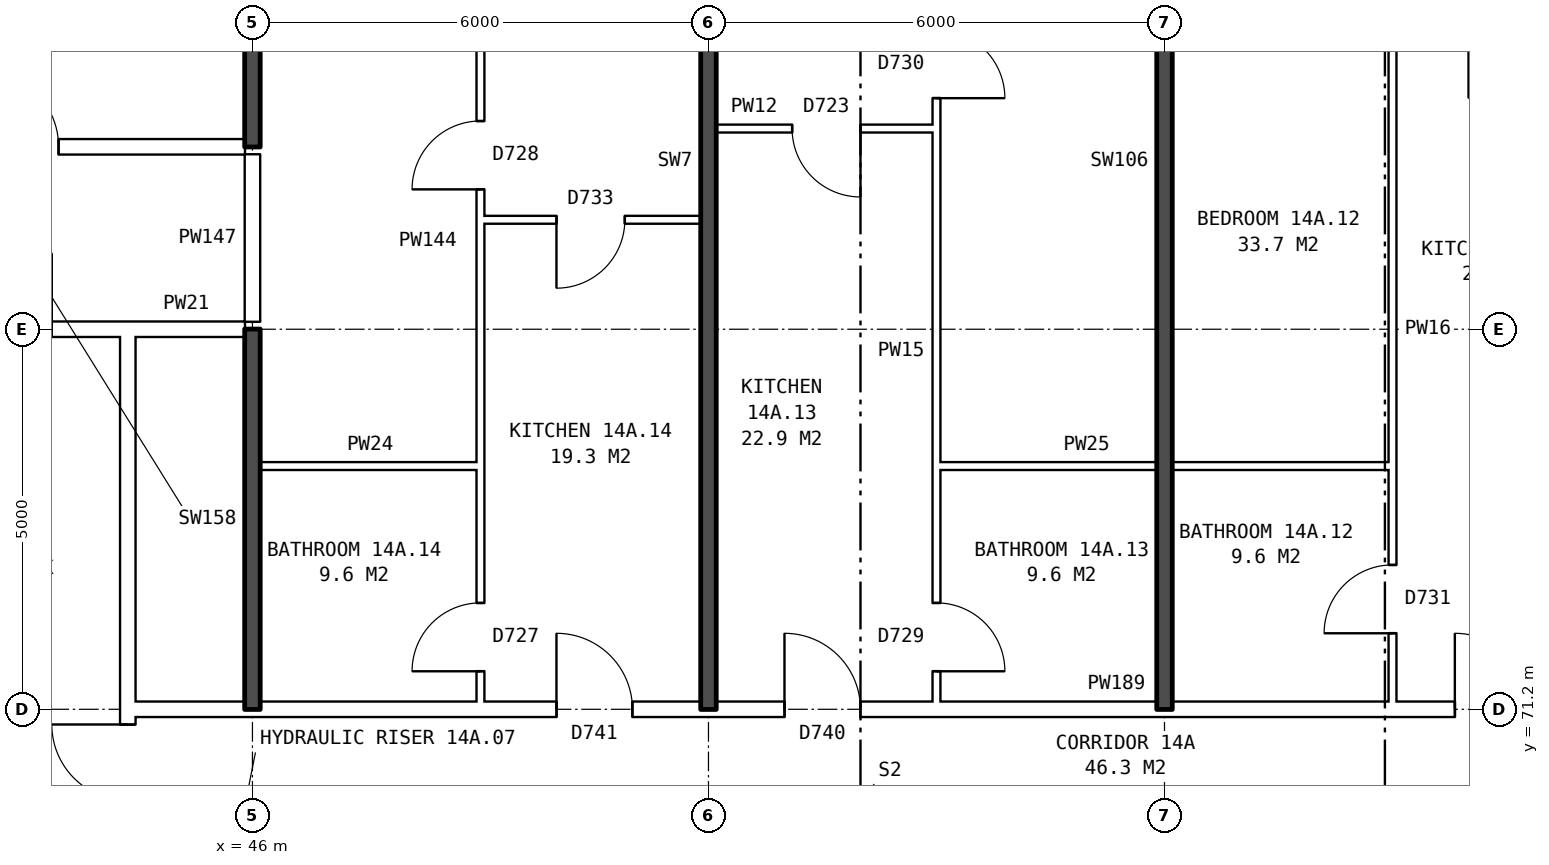
"""IFC4 building model, lengths in metres.
Left out: names, types, materials, properties, quantities, classifications, styles, units other than length and angle.
Written with IfcOpenShell. Run it as: python <this file> out.ifc"""

import sys

from ifc_helpers import new_model, si_unit, direction, frame, frame_2d, origin, place, context, subcontext, project, spatial, rectangle, extrude, element, fill, save


model = new_model("IFC4")
c1 = context("Model", 3, precision=1e-05, world=origin(), true_north=direction((0.0, 1.0)))
c2 = subcontext(c1, "Body", "Model", "MODEL_VIEW")
j1 = project(units=[si_unit("LENGTHUNIT", "METRE"), si_unit("PLANEANGLEUNIT", "RADIAN")], contexts=[c1])
p1 = place(None, origin())
s1 = spatial("IfcSite", under=j1, at=p1, CompositionType="ELEMENT")
p2 = place(p1, origin())
s2 = spatial("IfcBuilding", under=s1, at=p2, CompositionType="ELEMENT")
p3 = place(p2, frame((0.0, 0.0, 53.6)))
s3 = spatial("IfcBuildingStorey", under=s2, at=p3, CompositionType="ELEMENT", Elevation=53.6)
p4 = place(p3, frame((44.36, 63.9, 0.0), z_axis=(0.0, 0.0, 1.0), x_axis=(0.0, 1.0, 0.0)))
e1 = element("IfcWall", 1, at=p4, inside=s3, PredefinedType="PARTITIONING", context=c2, shape_type="SweptSolid", body=[
    extrude(rectangle(XDim=12.2, YDim=0.2, at=frame_2d((6.1, 0.0))), origin(), (0.0, 0.0, 1.0), 2.85),
])
p5 = place(p4, frame((5.1, 0.0, 0.0)))
e2 = element("IfcOpeningElement", 2, at=p5, cuts=e1, PredefinedType="OPENING", context=c2, shape_type="SweptSolid", body=[
    extrude(rectangle(XDim=2.0, YDim=2.1, at=frame_2d((1.0, 1.05))), frame((0.0, 0.11, 0.0), z_axis=(0.0, -1.0, 0.0), x_axis=(1.0, 0.0, 0.0)), (0.0, 0.0, 1.0), 0.22),
])
p6 = place(p3, frame((44.36, 71.2, 0.0), z_axis=(0.0, 0.0, 1.0), x_axis=(1.0, 0.0, 0.0)))
e3 = element("IfcWall", 3, at=p6, inside=s3, PredefinedType="PARTITIONING", context=c2, shape_type="SweptSolid", body=[
    extrude(rectangle(XDim=19.28, YDim=0.2, at=frame_2d((9.64, 0.0))), origin(), (0.0, 0.0, 1.0), 2.85),
])
p7 = place(p6, frame((17.46, 0.0, 0.0)))
e4 = element("IfcOpeningElement", 4, at=p7, cuts=e3, PredefinedType="OPENING", context=c2, shape_type="SweptSolid", body=[
    extrude(rectangle(XDim=1.0, YDim=2.1, at=frame_2d((0.5, 1.05))), frame((0.0, 0.11, 0.0), z_axis=(0.0, -1.0, 0.0), x_axis=(1.0, 0.0, 0.0)), (0.0, 0.0, 1.0), 0.22),
])
p8 = place(p6, frame((8.64, 0.0, 0.0)))
e5 = element("IfcOpeningElement", 5, at=p8, cuts=e3, PredefinedType="OPENING", context=c2, shape_type="SweptSolid", body=[
    extrude(rectangle(XDim=1.0, YDim=2.1, at=frame_2d((0.5, 1.05))), frame((0.0, 0.11, 0.0), z_axis=(0.0, -1.0, 0.0), x_axis=(1.0, 0.0, 0.0)), (0.0, 0.0, 1.0), 0.22),
])
p9 = place(p6, frame((5.64, 0.0, 0.0)))
e6 = element("IfcOpeningElement", 6, at=p9, cuts=e3, PredefinedType="OPENING", context=c2, shape_type="SweptSolid", body=[
    extrude(rectangle(XDim=1.0, YDim=2.1, at=frame_2d((0.5, 1.05))), frame((0.0, 0.11, 0.0), z_axis=(0.0, -1.0, 0.0), x_axis=(1.0, 0.0, 0.0)), (0.0, 0.0, 1.0), 0.22),
])
p10 = place(p3, frame((46.1, 74.4, 0.0), z_axis=(0.0, 0.0, 1.0), x_axis=(1.0, 0.0, 0.0)))
e7 = element("IfcWall", 7, at=p10, inside=s3, PredefinedType="PARTITIONING", context=c2, shape_type="SweptSolid", body=[
    extrude(rectangle(XDim=2.9, YDim=0.1, at=frame_2d((1.45, 0.0))), origin(), (0.0, 0.0, 1.0), 2.85),
])
p11 = place(p3, frame((55.0, 74.4, 0.0), z_axis=(0.0, 0.0, 1.0), x_axis=(1.0, 0.0, 0.0)))
e8 = element("IfcWall", 8, at=p11, inside=s3, PredefinedType="PARTITIONING", context=c2, shape_type="SweptSolid", body=[
    extrude(rectangle(XDim=6.0, YDim=0.1, at=frame_2d((3.0, 0.0))), origin(), (0.0, 0.0, 1.0), 2.85),
])
p12 = place(p3, frame((41.36, 76.2, 0.0), z_axis=(0.0, 0.0, 1.0), x_axis=(1.0, 0.0, 0.0)))
e9 = element("IfcWall", 9, at=p12, inside=s3, PredefinedType="PARTITIONING", context=c2, shape_type="SweptSolid", body=[
    extrude(rectangle(XDim=3.0, YDim=0.2, at=frame_2d((1.5, 0.0))), origin(), (0.0, 0.0, 1.0), 2.85),
])
p13 = place(p12, frame((1.0, 0.0, 0.0)))
e10 = element("IfcOpeningElement", 10, at=p13, cuts=e9, PredefinedType="OPENING", context=c2, shape_type="SweptSolid", body=[
    extrude(rectangle(XDim=1.0, YDim=2.1, at=frame_2d((0.5, 1.05))), frame((0.0, 0.11, 0.0), z_axis=(0.0, -1.0, 0.0), x_axis=(1.0, 0.0, 0.0)), (0.0, 0.0, 1.0), 0.22),
])
p14 = place(p3, frame((44.36, 76.2, 0.0), z_axis=(0.0, 0.0, 1.0), x_axis=(1.0, 0.0, 0.0)))
e11 = element("IfcWall", 11, at=p14, inside=s3, PredefinedType="PARTITIONING", context=c2, shape_type="SweptSolid", body=[
    extrude(rectangle(XDim=1.54, YDim=0.2, at=frame_2d((0.77, 0.0))), origin(), (0.0, 0.0, 1.0), 2.85),
])
p15 = place(p3, frame((49.0, 77.64, 0.0), z_axis=(0.0, 0.0, 1.0), x_axis=(1.0, 0.0, 0.0)))
e12 = element("IfcWall", 12, at=p15, inside=s3, PredefinedType="PARTITIONING", context=c2, shape_type="SweptSolid", body=[
    extrude(rectangle(XDim=2.9, YDim=0.1, at=frame_2d((1.45, 0.0))), origin(), (0.0, 0.0, 1.0), 2.85),
])
p16 = place(p15, frame((1.0, 0.0, 0.0)))
e13 = element("IfcOpeningElement", 13, at=p16, cuts=e12, PredefinedType="OPENING", context=c2, shape_type="SweptSolid", body=[
    extrude(rectangle(XDim=0.9, YDim=2.1, at=frame_2d((0.45, 1.05))), frame((0.0, 0.06, 0.0), z_axis=(0.0, -1.0, 0.0), x_axis=(1.0, 0.0, 0.0)), (0.0, 0.0, 1.0), 0.12),
])
p17 = place(p3, frame((21.86, 78.6, 0.0), z_axis=(0.0, 0.0, 1.0), x_axis=(1.0, 0.0, 0.0)))
e14 = element("IfcWall", 14, at=p17, inside=s3, PredefinedType="PARTITIONING", context=c2, shape_type="SweptSolid", body=[
    extrude(rectangle(XDim=24.04, YDim=0.2, at=frame_2d((12.02, 0.0))), origin(), (0.0, 0.0, 1.0), 2.85),
])
p18 = place(p17, frame((20.59, 0.0, 0.0)))
e15 = element("IfcOpeningElement", 15, at=p18, cuts=e14, PredefinedType="OPENING", context=c2, shape_type="SweptSolid", body=[
    extrude(rectangle(XDim=1.0, YDim=2.1, at=frame_2d((0.5, 1.05))), frame((0.0, 0.11, 0.0), z_axis=(0.0, -1.0, 0.0), x_axis=(1.0, 0.0, 0.0)), (0.0, 0.0, 1.0), 0.22),
])
p19 = place(p17, frame((8.64, 0.0, 0.0)))
e16 = element("IfcOpeningElement", 16, at=p19, cuts=e14, PredefinedType="OPENING", context=c2, shape_type="SweptSolid", body=[
    extrude(rectangle(XDim=1.0, YDim=2.1, at=frame_2d((0.5, 1.05))), frame((0.0, 0.11, 0.0), z_axis=(0.0, -1.0, 0.0), x_axis=(1.0, 0.0, 0.0)), (0.0, 0.0, 1.0), 0.22),
])
p20 = place(p17, frame((3.64, 0.0, 0.0)))
e17 = element("IfcOpeningElement", 17, at=p20, cuts=e14, PredefinedType="OPENING", context=c2, shape_type="SweptSolid", body=[
    extrude(rectangle(XDim=1.0, YDim=2.1, at=frame_2d((0.5, 1.05))), frame((0.0, 0.11, 0.0), z_axis=(0.0, -1.0, 0.0), x_axis=(1.0, 0.0, 0.0)), (0.0, 0.0, 1.0), 0.22),
])
p21 = place(p3, frame((52.1, 78.84, 0.0), z_axis=(0.0, 0.0, 1.0), x_axis=(1.0, 0.0, 0.0)))
e18 = element("IfcWall", 18, at=p21, inside=s3, PredefinedType="PARTITIONING", context=c2, shape_type="SweptSolid", body=[
    extrude(rectangle(XDim=2.9, YDim=0.1, at=frame_2d((1.45, 0.0))), origin(), (0.0, 0.0, 1.0), 2.85),
])
p22 = place(p21, frame((1.0, 0.0, 0.0)))
e19 = element("IfcOpeningElement", 19, at=p22, cuts=e18, PredefinedType="OPENING", context=c2, shape_type="SweptSolid", body=[
    extrude(rectangle(XDim=0.9, YDim=2.1, at=frame_2d((0.45, 1.05))), frame((0.0, 0.06, 0.0), z_axis=(0.0, -1.0, 0.0), x_axis=(1.0, 0.0, 0.0)), (0.0, 0.0, 1.0), 0.12),
])
p23 = place(p3, frame((46.0, 71.2, 0.0), z_axis=(0.0, 0.0, 1.0), x_axis=(0.0, 1.0, 0.0)))
e20 = element("IfcWall", 20, at=p23, inside=s3, PredefinedType="SOLIDWALL", context=c2, shape_type="SweptSolid", body=[
    extrude(rectangle(XDim=5.0, YDim=0.2, at=frame_2d((2.5, 0.0))), origin(), (0.0, 0.0, 1.0), 2.85),
])
p24 = place(p3, frame((46.0, 76.3, 0.0), z_axis=(0.0, 0.0, 1.0), x_axis=(0.0, 1.0, 0.0)))
e21 = element("IfcWall", 21, at=p24, inside=s3, PredefinedType="PARTITIONING", context=c2, shape_type="SweptSolid", body=[
    extrude(rectangle(XDim=2.2, YDim=0.2, at=frame_2d((1.1, 0.0))), origin(), (0.0, 0.0, 1.0), 2.85),
])
p25 = place(p3, frame((46.0, 78.6, 0.0), z_axis=(0.0, 0.0, 1.0), x_axis=(0.0, 1.0, 0.0)))
e22 = element("IfcWall", 22, at=p25, inside=s3, PredefinedType="SOLIDWALL", context=c2, shape_type="SweptSolid", body=[
    extrude(rectangle(XDim=7.04, YDim=0.2, at=frame_2d((3.52, 0.0))), origin(), (0.0, 0.0, 1.0), 2.85),
])
p26 = place(p3, frame((49.0, 71.3, 0.0), z_axis=(0.0, 0.0, 1.0), x_axis=(0.0, 1.0, 0.0)))
e23 = element("IfcWall", 23, at=p26, inside=s3, PredefinedType="PARTITIONING", context=c2, shape_type="SweptSolid", body=[
    extrude(rectangle(XDim=14.34, YDim=0.1, at=frame_2d((7.17, 0.0))), origin(), (0.0, 0.0, 1.0), 2.85),
])
p27 = place(p26, frame((6.74, 0.0, 0.0)))
e24 = element("IfcOpeningElement", 24, at=p27, cuts=e23, PredefinedType="OPENING", context=c2, shape_type="SweptSolid", body=[
    extrude(rectangle(XDim=0.9, YDim=2.1, at=frame_2d((0.45, 1.05))), frame((0.0, 0.06, 0.0), z_axis=(0.0, -1.0, 0.0), x_axis=(1.0, 0.0, 0.0)), (0.0, 0.0, 1.0), 0.12),
])
p28 = place(p26, frame((0.4, 0.0, 0.0)))
e25 = element("IfcOpeningElement", 25, at=p28, cuts=e23, PredefinedType="OPENING", context=c2, shape_type="SweptSolid", body=[
    extrude(rectangle(XDim=0.9, YDim=2.1, at=frame_2d((0.45, 1.05))), frame((0.0, 0.06, 0.0), z_axis=(0.0, -1.0, 0.0), x_axis=(1.0, 0.0, 0.0)), (0.0, 0.0, 1.0), 0.12),
])
p29 = place(p3, frame((52.0, 71.2, 0.0), z_axis=(0.0, 0.0, 1.0), x_axis=(0.0, 1.0, 0.0)))
e26 = element("IfcWall", 26, at=p29, inside=s3, PredefinedType="SOLIDWALL", context=c2, shape_type="SweptSolid", body=[
    extrude(rectangle(XDim=14.44, YDim=0.2, at=frame_2d((7.22, 0.0))), origin(), (0.0, 0.0, 1.0), 2.85),
])
p30 = place(p3, frame((55.0, 71.3, 0.0), z_axis=(0.0, 0.0, 1.0), x_axis=(0.0, 1.0, 0.0)))
e27 = element("IfcWall", 27, at=p30, inside=s3, PredefinedType="PARTITIONING", context=c2, shape_type="SweptSolid", body=[
    extrude(rectangle(XDim=14.34, YDim=0.1, at=frame_2d((7.17, 0.0))), origin(), (0.0, 0.0, 1.0), 2.85),
])
p31 = place(p30, frame((7.94, 0.0, 0.0)))
e28 = element("IfcOpeningElement", 28, at=p31, cuts=e27, PredefinedType="OPENING", context=c2, shape_type="SweptSolid", body=[
    extrude(rectangle(XDim=0.9, YDim=2.1, at=frame_2d((0.45, 1.05))), frame((0.0, 0.06, 0.0), z_axis=(0.0, -1.0, 0.0), x_axis=(1.0, 0.0, 0.0)), (0.0, 0.0, 1.0), 0.12),
])
p32 = place(p30, frame((0.4, 0.0, 0.0)))
e29 = element("IfcOpeningElement", 29, at=p32, cuts=e27, PredefinedType="OPENING", context=c2, shape_type="SweptSolid", body=[
    extrude(rectangle(XDim=0.9, YDim=2.1, at=frame_2d((0.45, 1.05))), frame((0.0, 0.06, 0.0), z_axis=(0.0, -1.0, 0.0), x_axis=(1.0, 0.0, 0.0)), (0.0, 0.0, 1.0), 0.12),
])
p33 = place(p3, frame((58.0, 71.2, 0.0), z_axis=(0.0, 0.0, 1.0), x_axis=(0.0, 1.0, 0.0)))
e30 = element("IfcWall", 30, at=p33, inside=s3, PredefinedType="SOLIDWALL", context=c2, shape_type="SweptSolid", body=[
    extrude(rectangle(XDim=14.44, YDim=0.2, at=frame_2d((7.22, 0.0))), origin(), (0.0, 0.0, 1.0), 2.85),
])
p34 = place(p3, frame((61.0, 71.3, 0.0), z_axis=(0.0, 0.0, 1.0), x_axis=(0.0, 1.0, 0.0)))
e31 = element("IfcWall", 31, at=p34, inside=s3, PredefinedType="PARTITIONING", context=c2, shape_type="SweptSolid", body=[
    extrude(rectangle(XDim=14.34, YDim=0.1, at=frame_2d((7.17, 0.0))), origin(), (0.0, 0.0, 1.0), 2.85),
])
p35 = place(p34, frame((9.24, 0.0, 0.0)))
e32 = element("IfcOpeningElement", 32, at=p35, cuts=e31, PredefinedType="OPENING", context=c2, shape_type="SweptSolid", body=[
    extrude(rectangle(XDim=0.9, YDim=2.1, at=frame_2d((0.45, 1.05))), frame((0.0, 0.06, 0.0), z_axis=(0.0, -1.0, 0.0), x_axis=(1.0, 0.0, 0.0)), (0.0, 0.0, 1.0), 0.12),
])
p36 = place(p34, frame((0.9, 0.0, 0.0)))
e33 = element("IfcOpeningElement", 33, at=p36, cuts=e31, PredefinedType="OPENING", context=c2, shape_type="SweptSolid", body=[
    extrude(rectangle(XDim=0.9, YDim=2.1, at=frame_2d((0.45, 1.05))), frame((0.0, 0.06, 0.0), z_axis=(0.0, -1.0, 0.0), x_axis=(1.0, 0.0, 0.0)), (0.0, 0.0, 1.0), 0.12),
])
p37 = place(p5, origin())
e34 = element("IfcDoor", 34, at=p37, inside=s3, OperationType="DOUBLE_DOOR_SINGLE_SWING", PredefinedType="DOOR", context=c2, shape_type="SweptSolid", body=[
    extrude(rectangle(XDim=2.0, YDim=2.1, at=frame_2d((1.0, 1.05))), frame((0.0, 0.025, 0.0), z_axis=(0.0, -1.0, 0.0), x_axis=(1.0, 0.0, 0.0)), (0.0, 0.0, 1.0), 0.05),
])
fill(e2, e34)
p38 = place(p7, origin())
e35 = element("IfcDoor", 35, at=p38, inside=s3, OperationType="SINGLE_SWING_LEFT", PredefinedType="DOOR", context=c2, shape_type="SweptSolid", body=[
    extrude(rectangle(XDim=1.0, YDim=2.1, at=frame_2d((0.5, 1.05))), frame((0.0, 0.025, 0.0), z_axis=(0.0, -1.0, 0.0), x_axis=(1.0, 0.0, 0.0)), (0.0, 0.0, 1.0), 0.05),
])
fill(e4, e35)
p39 = place(p36, origin())
e36 = element("IfcDoor", 36, at=p39, inside=s3, OperationType="SINGLE_SWING_LEFT", PredefinedType="DOOR", context=c2, shape_type="SweptSolid", body=[
    extrude(rectangle(XDim=0.9, YDim=2.1, at=frame_2d((0.45, 1.05))), frame((0.0, 0.025, 0.0), z_axis=(0.0, -1.0, 0.0), x_axis=(1.0, 0.0, 0.0)), (0.0, 0.0, 1.0), 0.05),
])
fill(e33, e36)
p40 = place(p31, frame((0.9, 0.0, 0.0), z_axis=(0.0, 0.0, 1.0), x_axis=(-1.0, 0.0, 0.0)))
e37 = element("IfcDoor", 37, at=p40, inside=s3, OperationType="SINGLE_SWING_RIGHT", PredefinedType="DOOR", context=c2, shape_type="SweptSolid", body=[
    extrude(rectangle(XDim=0.9, YDim=2.1, at=frame_2d((0.45, 1.05))), frame((0.0, 0.025, 0.0), z_axis=(0.0, -1.0, 0.0), x_axis=(1.0, 0.0, 0.0)), (0.0, 0.0, 1.0), 0.05),
])
fill(e28, e37)
p41 = place(p8, origin())
e38 = element("IfcDoor", 38, at=p41, inside=s3, OperationType="SINGLE_SWING_LEFT", PredefinedType="DOOR", context=c2, shape_type="SweptSolid", body=[
    extrude(rectangle(XDim=1.0, YDim=2.1, at=frame_2d((0.5, 1.05))), frame((0.0, 0.025, 0.0), z_axis=(0.0, -1.0, 0.0), x_axis=(1.0, 0.0, 0.0)), (0.0, 0.0, 1.0), 0.05),
])
fill(e5, e38)
p42 = place(p22, frame((0.9, 0.0, 0.0), z_axis=(0.0, 0.0, 1.0), x_axis=(-1.0, 0.0, 0.0)))
e39 = element("IfcDoor", 39, at=p42, inside=s3, OperationType="SINGLE_SWING_LEFT", PredefinedType="DOOR", context=c2, shape_type="SweptSolid", body=[
    extrude(rectangle(XDim=0.9, YDim=2.1, at=frame_2d((0.45, 1.05))), frame((0.0, 0.025, 0.0), z_axis=(0.0, -1.0, 0.0), x_axis=(1.0, 0.0, 0.0)), (0.0, 0.0, 1.0), 0.05),
])
fill(e19, e39)
p43 = place(p32, frame((0.9, 0.0, 0.0), z_axis=(0.0, 0.0, 1.0), x_axis=(-1.0, 0.0, 0.0)))
e40 = element("IfcDoor", 40, at=p43, inside=s3, OperationType="SINGLE_SWING_RIGHT", PredefinedType="DOOR", context=c2, shape_type="SweptSolid", body=[
    extrude(rectangle(XDim=0.9, YDim=2.1, at=frame_2d((0.45, 1.05))), frame((0.0, 0.025, 0.0), z_axis=(0.0, -1.0, 0.0), x_axis=(1.0, 0.0, 0.0)), (0.0, 0.0, 1.0), 0.05),
])
fill(e29, e40)
p44 = place(p27, origin())
e41 = element("IfcDoor", 41, at=p44, inside=s3, OperationType="SINGLE_SWING_LEFT", PredefinedType="DOOR", context=c2, shape_type="SweptSolid", body=[
    extrude(rectangle(XDim=0.9, YDim=2.1, at=frame_2d((0.45, 1.05))), frame((0.0, 0.025, 0.0), z_axis=(0.0, -1.0, 0.0), x_axis=(1.0, 0.0, 0.0)), (0.0, 0.0, 1.0), 0.05),
])
fill(e24, e41)
p45 = place(p9, origin())
e42 = element("IfcDoor", 42, at=p45, inside=s3, OperationType="SINGLE_SWING_LEFT", PredefinedType="DOOR", context=c2, shape_type="SweptSolid", body=[
    extrude(rectangle(XDim=1.0, YDim=2.1, at=frame_2d((0.5, 1.05))), frame((0.0, 0.025, 0.0), z_axis=(0.0, -1.0, 0.0), x_axis=(1.0, 0.0, 0.0)), (0.0, 0.0, 1.0), 0.05),
])
fill(e6, e42)
p46 = place(p16, frame((0.9, 0.0, 0.0), z_axis=(0.0, 0.0, 1.0), x_axis=(-1.0, 0.0, 0.0)))
e43 = element("IfcDoor", 43, at=p46, inside=s3, OperationType="SINGLE_SWING_RIGHT", PredefinedType="DOOR", context=c2, shape_type="SweptSolid", body=[
    extrude(rectangle(XDim=0.9, YDim=2.1, at=frame_2d((0.45, 1.05))), frame((0.0, 0.025, 0.0), z_axis=(0.0, -1.0, 0.0), x_axis=(1.0, 0.0, 0.0)), (0.0, 0.0, 1.0), 0.05),
])
fill(e13, e43)
p47 = place(p28, origin())
e44 = element("IfcDoor", 44, at=p47, inside=s3, OperationType="SINGLE_SWING_LEFT", PredefinedType="DOOR", context=c2, shape_type="SweptSolid", body=[
    extrude(rectangle(XDim=0.9, YDim=2.1, at=frame_2d((0.45, 1.05))), frame((0.0, 0.025, 0.0), z_axis=(0.0, -1.0, 0.0), x_axis=(1.0, 0.0, 0.0)), (0.0, 0.0, 1.0), 0.05),
])
fill(e25, e44)
p48 = place(p18, origin())
e45 = element("IfcDoor", 45, at=p48, inside=s3, OperationType="SINGLE_SWING_LEFT", PredefinedType="DOOR", context=c2, shape_type="SweptSolid", body=[
    extrude(rectangle(XDim=1.0, YDim=2.1, at=frame_2d((0.5, 1.05))), frame((0.0, 0.025, 0.0), z_axis=(0.0, -1.0, 0.0), x_axis=(1.0, 0.0, 0.0)), (0.0, 0.0, 1.0), 0.05),
])
fill(e15, e45)
save(model, sys.argv[1])
